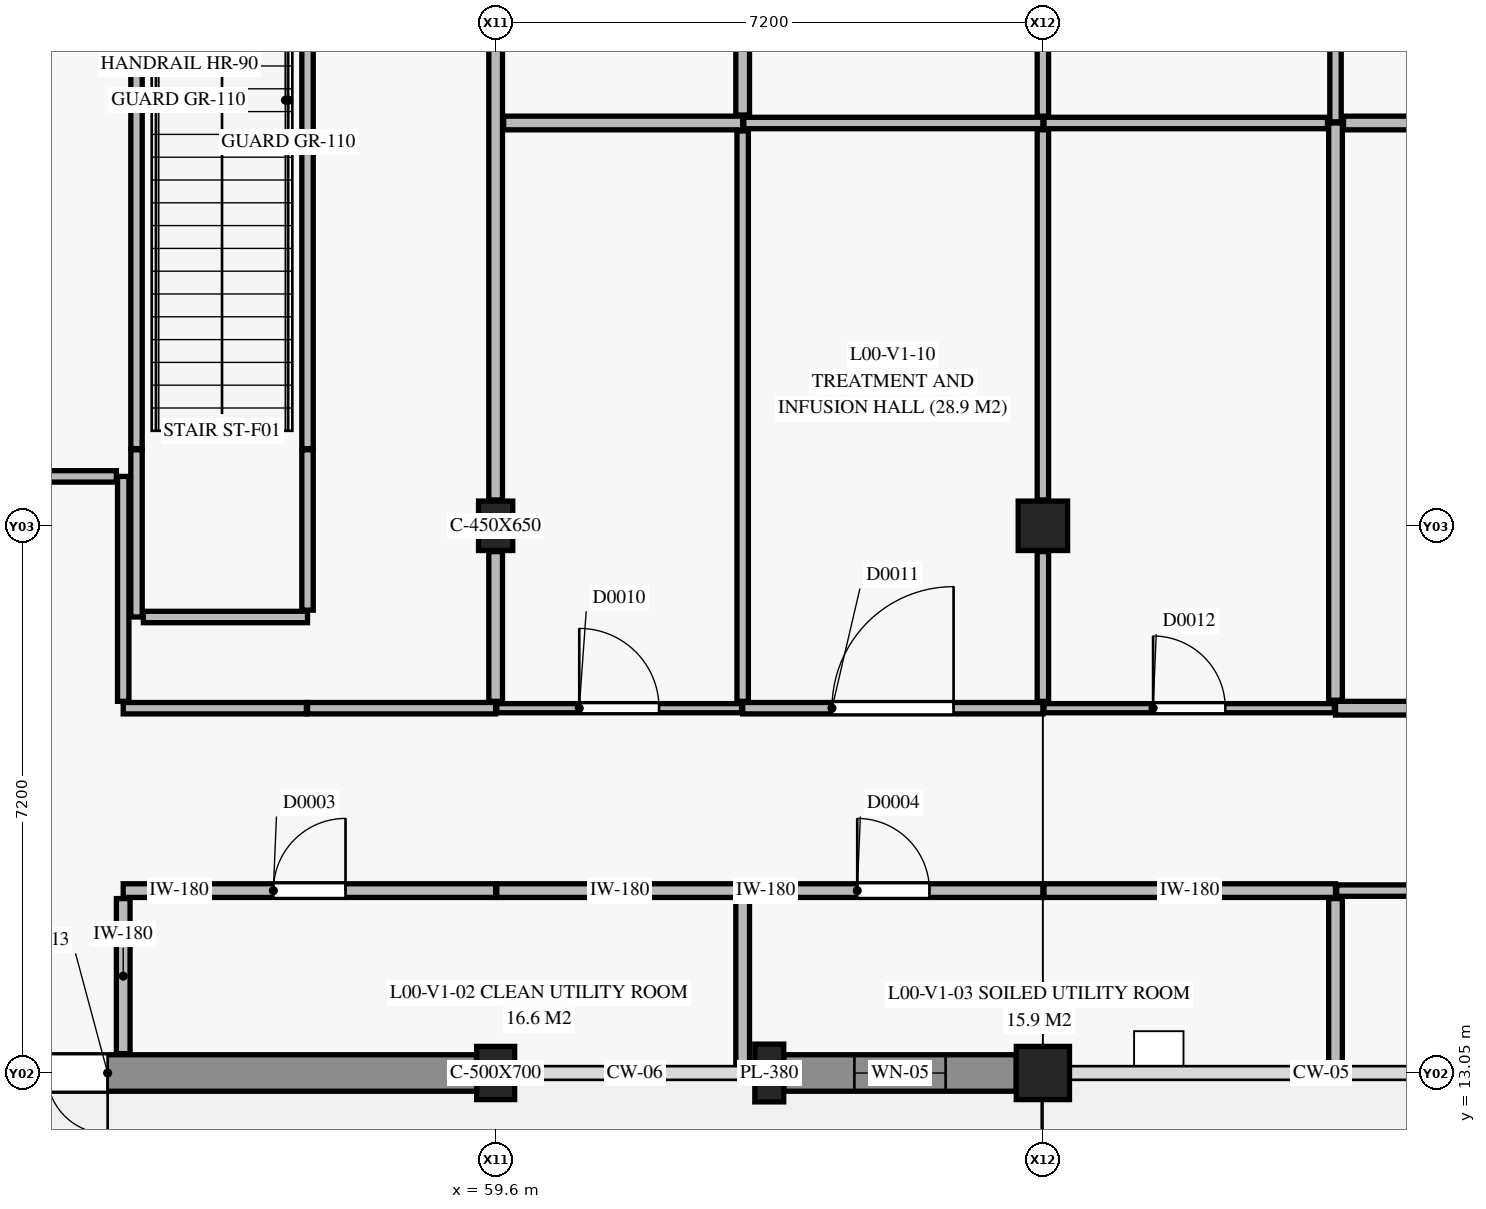
"""IFC4 building model, lengths in metres.
Left out: names, types, materials, properties, quantities, classifications, styles, units other than length and angle.
Written with IfcOpenShell. Run it as: python <this file> out.ifc"""

import sys

from ifc_helpers import new_model, si_unit, direction, frame, frame_2d, origin, origin_2d, place, context, subcontext, project, spatial, rectangle, extrude, element, fill, save


model = new_model("IFC4")
c1 = context("Model", 3, precision=1e-05, world=origin(), true_north=direction((0.0, 1.0)))
c2 = subcontext(c1, "Body", "Model", "MODEL_VIEW")
j1 = project(units=[si_unit("LENGTHUNIT", "METRE"), si_unit("PLANEANGLEUNIT", "RADIAN")], contexts=[c1])
p1 = place(None, origin())
s1 = spatial("IfcSite", under=j1, at=p1, CompositionType="ELEMENT")
p2 = place(p1, origin())
s2 = spatial("IfcBuilding", under=s1, at=p2, CompositionType="ELEMENT")
p3 = place(p2, origin())
s3 = spatial("IfcBuildingStorey", under=s2, at=p3, CompositionType="ELEMENT", Elevation=0.0)
p4 = place(p3, frame((59.6, 13.05, 0.0), z_axis=(0.0, 0.0, 1.0), x_axis=(1.0, 0.0, 0.0)))
e1 = element("IfcColumn", 1, at=p4, inside=s3, PredefinedType="COLUMN", context=c2, shape_type="SweptSolid", body=[
    extrude(rectangle(XDim=0.5, YDim=0.7, at=origin_2d()), origin(), (0.0, 0.0, 1.0), 4.8),
])
p5 = place(p3, frame((59.6, 20.25, 0.0), z_axis=(0.0, 0.0, 1.0), x_axis=(1.0, 0.0, 0.0)))
e2 = element("IfcColumn", 2, at=p5, inside=s3, PredefinedType="COLUMN", context=c2, shape_type="SweptSolid", body=[
    extrude(rectangle(XDim=0.45, YDim=0.65, at=origin_2d()), origin(), (0.0, 0.0, 1.0), 4.8),
])
p6 = place(p3, frame((66.8, 13.05, 0.0), z_axis=(0.0, 0.0, 1.0), x_axis=(1.0, 0.0, 0.0)))
e3 = element("IfcColumn", 3, at=p6, inside=s3, PredefinedType="COLUMN", context=c2, shape_type="SweptSolid", body=[
    extrude(rectangle(XDim=0.7, YDim=0.7, at=origin_2d()), origin(), (0.0, 0.0, 1.0), 4.8),
])
p7 = place(p3, frame((66.8, 20.25, 0.0), z_axis=(0.0, 0.0, 1.0), x_axis=(1.0, 0.0, 0.0)))
e4 = element("IfcColumn", 4, at=p7, inside=s3, PredefinedType="COLUMN", context=c2, shape_type="SweptSolid", body=[
    extrude(rectangle(XDim=0.65, YDim=0.65, at=origin_2d()), origin(), (0.0, 0.0, 1.0), 4.8),
])
p8 = place(p3, frame((63.2, 13.05, 0.0), z_axis=(0.0, 0.0, 1.0), x_axis=(1.0, 0.0, 0.0)))
e5 = element("IfcColumn", 5, at=p8, inside=s3, PredefinedType="PILASTER", context=c2, shape_type="SweptSolid", body=[
    extrude(rectangle(XDim=0.38, YDim=0.76, at=origin_2d()), origin(), (0.0, 0.0, 1.0), 4.8),
])
p9 = place(p3, frame((66.45, 13.05, 0.0), z_axis=(0.0, 0.0, 1.0), x_axis=(-1.0, 0.0, 0.0)))
e6 = element("IfcWall", 6, at=p9, inside=s3, PredefinedType="SOLIDWALL", context=c2, shape_type="SweptSolid", body=[
    extrude(rectangle(XDim=3.06, YDim=0.48, at=frame_2d((1.53, 0.0))), origin(), (0.0, 0.0, 1.0), 3.73),
])
p10 = place(p9, frame((0.93, 0.0, 0.9)))
e7 = element("IfcOpeningElement", 7, at=p10, cuts=e6, PredefinedType="OPENING", context=c2, shape_type="SweptSolid", body=[
    extrude(rectangle(XDim=1.2, YDim=1.8, at=frame_2d((0.6, 0.9))), frame((0.0, 0.25, 0.0), z_axis=(0.0, -1.0, 0.0), x_axis=(1.0, 0.0, 0.0)), (0.0, 0.0, 1.0), 0.5),
])
p11 = place(p3, frame((59.35, 13.05, 0.0), z_axis=(0.0, 0.0, 1.0), x_axis=(-1.0, 0.0, 0.0)))
e8 = element("IfcWall", 8, at=p11, inside=s3, PredefinedType="SOLIDWALL", context=c2, shape_type="SweptSolid", body=[
    extrude(rectangle(XDim=6.95, YDim=0.48, at=frame_2d((3.475, 0.0))), origin(), (0.0, 0.0, 1.0), 3.73),
])
p12 = place(p11, frame((4.855, 0.0, 0.0)))
e9 = element("IfcOpeningElement", 9, at=p12, cuts=e8, PredefinedType="OPENING", context=c2, shape_type="SweptSolid", body=[
    extrude(rectangle(XDim=1.6, YDim=2.3, at=frame_2d((0.8, 1.15))), frame((0.0, 0.25, 0.0), z_axis=(0.0, -1.0, 0.0), x_axis=(1.0, 0.0, 0.0)), (0.0, 0.0, 1.0), 0.5),
])
p13 = place(p3, frame((54.7, 15.45, 0.0), z_axis=(0.0, 0.0, 1.0), x_axis=(1.0, 0.0, 0.0)))
e10 = element("IfcWall", 10, at=p13, inside=s3, PredefinedType="PLUMBINGWALL", context=c2, shape_type="SweptSolid", body=[
    extrude(rectangle(XDim=4.9, YDim=0.18, at=frame_2d((2.45, 0.0))), origin(), (0.0, 0.0, 1.0), 3.955),
])
p14 = place(p13, frame((1.975, 0.0, 0.0)))
e11 = element("IfcOpeningElement", 11, at=p14, cuts=e10, PredefinedType="OPENING", context=c2, shape_type="SweptSolid", body=[
    extrude(rectangle(XDim=0.95, YDim=2.1, at=frame_2d((0.475, 1.05))), frame((0.0, 0.1, 0.0), z_axis=(0.0, -1.0, 0.0), x_axis=(1.0, 0.0, 0.0)), (0.0, 0.0, 1.0), 0.2),
])
p15 = place(p3, frame((59.615, 15.45, 0.0), z_axis=(0.0, 0.0, 1.0), x_axis=(1.0, 0.0, 0.0)))
e12 = element("IfcWall", 12, at=p15, inside=s3, PredefinedType="PLUMBINGWALL", context=c2, shape_type="SweptSolid", body=[
    extrude(rectangle(XDim=3.235, YDim=0.18, at=frame_2d((1.618, 0.0))), origin(), (0.0, 0.0, 1.0), 3.955),
])
p16 = place(p3, frame((54.7, 13.305, 0.0), z_axis=(0.0, 0.0, 1.0), x_axis=(0.0, 1.0, 0.0)))
e13 = element("IfcWall", 13, at=p16, inside=s3, PredefinedType="PLUMBINGWALL", context=c2, shape_type="SweptSolid", body=[
    extrude(rectangle(XDim=2.04, YDim=0.18, at=frame_2d((1.02, 0.0))), origin(), (0.0, 0.0, 1.0), 4.115),
])
p17 = place(p3, frame((62.865, 15.45, 0.0), z_axis=(0.0, 0.0, 1.0), x_axis=(1.0, 0.0, 0.0)))
e14 = element("IfcWall", 14, at=p17, inside=s3, PredefinedType="PLUMBINGWALL", context=c2, shape_type="SweptSolid", body=[
    extrude(rectangle(XDim=3.935, YDim=0.18, at=frame_2d((1.968, 0.0))), origin(), (0.0, 0.0, 1.0), 3.735),
])
p18 = place(p17, frame((1.492, 0.0, 0.0)))
e15 = element("IfcOpeningElement", 15, at=p18, cuts=e14, PredefinedType="OPENING", context=c2, shape_type="SweptSolid", body=[
    extrude(rectangle(XDim=0.95, YDim=2.1, at=frame_2d((0.475, 1.05))), frame((0.0, 0.1, 0.0), z_axis=(0.0, -1.0, 0.0), x_axis=(1.0, 0.0, 0.0)), (0.0, 0.0, 1.0), 0.2),
])
p19 = place(p3, frame((66.815, 15.45, 0.0), z_axis=(0.0, 0.0, 1.0), x_axis=(1.0, 0.0, 0.0)))
e16 = element("IfcWall", 16, at=p19, inside=s3, PredefinedType="PLUMBINGWALL", context=c2, shape_type="SweptSolid", body=[
    extrude(rectangle(XDim=3.835, YDim=0.18, at=frame_2d((1.917, 0.0))), origin(), (0.0, 0.0, 1.0), 3.735),
])
p20 = place(p3, frame((70.65, 17.85, 0.0), z_axis=(0.0, 0.0, 1.0), x_axis=(1.0, 0.0, 0.0)))
e17 = element("IfcWall", 17, at=p20, inside=s3, PredefinedType="PLUMBINGWALL", context=c2, shape_type="SweptSolid", body=[
    extrude(rectangle(XDim=3.35, YDim=0.18, at=frame_2d((1.675, 0.0))), origin(), (0.0, 0.0, 1.0), 3.835),
])
p21 = place(p20, frame((1.2, 0.0, 0.0)))
e18 = element("IfcOpeningElement", 18, at=p21, cuts=e17, PredefinedType="OPENING", context=c2, shape_type="SweptSolid", body=[
    extrude(rectangle(XDim=0.95, YDim=2.1, at=frame_2d((0.475, 1.05))), frame((0.0, 0.1, 0.0), z_axis=(0.0, -1.0, 0.0), x_axis=(1.0, 0.0, 0.0)), (0.0, 0.0, 1.0), 0.2),
])
p22 = place(p3, frame((70.665, 15.45, 0.0), z_axis=(0.0, 0.0, 1.0), x_axis=(1.0, 0.0, 0.0)))
e19 = element("IfcWall", 19, at=p22, inside=s3, PredefinedType="PARTITIONING", context=c2, shape_type="SweptSolid", body=[
    extrude(rectangle(XDim=3.335, YDim=0.15, at=frame_2d((1.667, 0.0))), origin(), (0.0, 0.0, 1.0), 3.835),
])
p23 = place(p3, frame((62.85, 17.85, 0.0), z_axis=(0.0, 0.0, 1.0), x_axis=(1.0, 0.0, 0.0)))
e20 = element("IfcWall", 20, at=p23, inside=s3, PredefinedType="PARTITIONING", context=c2, shape_type="SweptSolid", body=[
    extrude(rectangle(XDim=3.95, YDim=0.15, at=frame_2d((1.975, 0.0))), origin(), (0.0, 0.0, 1.0), 3.735),
])
p24 = place(p23, frame((1.175, 0.0, 0.0)))
e21 = element("IfcOpeningElement", 21, at=p24, cuts=e20, PredefinedType="OPENING", context=c2, shape_type="SweptSolid", body=[
    extrude(rectangle(XDim=1.6, YDim=2.25, at=frame_2d((0.8, 1.125))), frame((0.0, 0.085, 0.0), z_axis=(0.0, -1.0, 0.0), x_axis=(1.0, 0.0, 0.0)), (0.0, 0.0, 1.0), 0.17),
])
p25 = place(p3, frame((54.875, 19.05, 0.0), z_axis=(0.0, 0.0, 1.0), x_axis=(0.0, 1.0, 0.0)))
e22 = element("IfcWall", 22, at=p25, inside=s3, PredefinedType="PARTITIONING", context=c2, shape_type="SweptSolid", body=[
    extrude(rectangle(XDim=2.2, YDim=0.15, at=frame_2d((1.1, 0.0))), origin(), (0.0, 0.0, 1.0), 3.735),
])
p26 = place(p3, frame((57.125, 17.85, 0.0), z_axis=(0.0, 0.0, 1.0), x_axis=(1.0, 0.0, 0.0)))
e23 = element("IfcWall", 23, at=p26, inside=s3, PredefinedType="PARTITIONING", context=c2, shape_type="SweptSolid", body=[
    extrude(rectangle(XDim=2.475, YDim=0.15, at=frame_2d((1.238, 0.0))), origin(), (0.0, 0.0, 1.0), 3.955),
])
p27 = place(p3, frame((54.7, 17.85, 0.0), z_axis=(0.0, 0.0, 1.0), x_axis=(1.0, 0.0, 0.0)))
e24 = element("IfcWall", 24, at=p27, inside=s3, PredefinedType="PARTITIONING", context=c2, shape_type="SweptSolid", body=[
    extrude(rectangle(XDim=2.41, YDim=0.15, at=frame_2d((1.205, 0.0))), origin(), (0.0, 0.0, 1.0), 4.115),
])
p28 = place(p3, frame((54.7, 17.94, 0.0), z_axis=(0.0, 0.0, 1.0), x_axis=(0.0, 1.0, 0.0)))
e25 = element("IfcWall", 25, at=p28, inside=s3, PredefinedType="PARTITIONING", context=c2, shape_type="SweptSolid", body=[
    extrude(rectangle(XDim=2.96, YDim=0.15, at=frame_2d((1.48, 0.0))), origin(), (0.0, 0.0, 1.0), 3.735),
])
p29 = place(p3, frame((52.415, 20.9, 0.0), z_axis=(0.0, 0.0, 1.0), x_axis=(1.0, 0.0, 0.0)))
e26 = element("IfcWall", 26, at=p29, inside=s3, PredefinedType="PARTITIONING", context=c2, shape_type="SweptSolid", body=[
    extrude(rectangle(XDim=2.195, YDim=0.15, at=frame_2d((1.098, 0.0))), origin(), (0.0, 0.0, 1.0), 4.55),
])
p30 = place(p3, frame((59.615, 17.85, 0.0), z_axis=(0.0, 0.0, 1.0), x_axis=(1.0, 0.0, 0.0)))
e27 = element("IfcWall", 27, at=p30, inside=s3, PredefinedType="PARTITIONING", context=c2, shape_type="SweptSolid", body=[
    extrude(rectangle(XDim=3.22, YDim=0.12, at=frame_2d((1.61, 0.0))), origin(), (0.0, 0.0, 1.0), 3.955),
])
p31 = place(p30, frame((1.085, 0.0, 0.0)))
e28 = element("IfcOpeningElement", 28, at=p31, cuts=e27, PredefinedType="OPENING", context=c2, shape_type="SweptSolid", body=[
    extrude(rectangle(XDim=1.05, YDim=2.15, at=frame_2d((0.525, 1.075))), frame((0.0, 0.07, 0.0), z_axis=(0.0, -1.0, 0.0), x_axis=(1.0, 0.0, 0.0)), (0.0, 0.0, 1.0), 0.14),
])
p32 = place(p3, frame((66.815, 17.85, 0.0), z_axis=(0.0, 0.0, 1.0), x_axis=(1.0, 0.0, 0.0)))
e29 = element("IfcWall", 29, at=p32, inside=s3, PredefinedType="PARTITIONING", context=c2, shape_type="SweptSolid", body=[
    extrude(rectangle(XDim=3.82, YDim=0.12, at=frame_2d((1.91, 0.0))), origin(), (0.0, 0.0, 1.0), 3.735),
])
p33 = place(p32, frame((1.435, 0.0, 0.0)))
e30 = element("IfcOpeningElement", 30, at=p33, cuts=e29, PredefinedType="OPENING", context=c2, shape_type="SweptSolid", body=[
    extrude(rectangle(XDim=0.95, YDim=2.1, at=frame_2d((0.475, 1.05))), frame((0.0, 0.07, 0.0), z_axis=(0.0, -1.0, 0.0), x_axis=(1.0, 0.0, 0.0)), (0.0, 0.0, 1.0), 0.14),
])
for number, where, z_axis, x_axis in (
    (31, (62.85, 13.155, 0.0), (0.0, 0.0, 1.0), (0.0, 1.0, 0.0)),
    (32, (70.65, 13.155, 0.0), (0.0, 0.0, 1.0), (0.0, 1.0, 0.0)),
):
    element("IfcWall", number, at=place(p3, frame(where, z_axis=z_axis, x_axis=x_axis)), inside=s3, PredefinedType="PLUMBINGWALL", context=c2, shape_type="SweptSolid", body=[
        extrude(rectangle(XDim=2.19, YDim=0.18, at=frame_2d((1.095, 0.0))), origin(), (0.0, 0.0, 1.0), 4.55),
    ])
p34 = place(p3, frame((59.6, 17.94, 0.0), z_axis=(0.0, 0.0, 1.0), x_axis=(0.0, 1.0, 0.0)))
e33 = element("IfcWall", 33, at=p34, inside=s3, PredefinedType="PLUMBINGWALL", context=c2, shape_type="SweptSolid", body=[
    extrude(rectangle(XDim=1.97, YDim=0.18, at=frame_2d((0.985, 0.0))), origin(), (0.0, 0.0, 1.0), 3.955),
])
p35 = place(p3, frame((59.6, 20.59, 0.0), z_axis=(0.0, 0.0, 1.0), x_axis=(0.0, 1.0, 0.0)))
e34 = element("IfcWall", 34, at=p35, inside=s3, PredefinedType="PLUMBINGWALL", context=c2, shape_type="SweptSolid", body=[
    extrude(rectangle(XDim=6.545, YDim=0.18, at=frame_2d((3.272, 0.0))), origin(), (0.0, 0.0, 1.0), 3.985),
])
p36 = place(p3, frame((59.705, 25.55, 0.0), z_axis=(0.0, 0.0, 1.0), x_axis=(1.0, 0.0, 0.0)))
e35 = element("IfcWall", 35, at=p36, inside=s3, PredefinedType="PLUMBINGWALL", context=c2, shape_type="SweptSolid", body=[
    extrude(rectangle(XDim=3.145, YDim=0.18, at=frame_2d((1.573, 0.0))), origin(), (0.0, 0.0, 1.0), 4.55),
])
p37 = place(p3, frame((70.65, 17.955, 0.0), z_axis=(0.0, 0.0, 1.0), x_axis=(0.0, 1.0, 0.0)))
e36 = element("IfcWall", 36, at=p37, inside=s3, PredefinedType="PLUMBINGWALL", context=c2, shape_type="SweptSolid", body=[
    extrude(rectangle(XDim=7.595, YDim=0.18, at=frame_2d((3.797, 0.0))), origin(), (0.0, 0.0, 1.0), 3.955),
])
p38 = place(p3, frame((70.755, 25.55, 0.0), z_axis=(0.0, 0.0, 1.0), x_axis=(1.0, 0.0, 0.0)))
e37 = element("IfcWall", 37, at=p38, inside=s3, PredefinedType="PLUMBINGWALL", context=c2, shape_type="SweptSolid", body=[
    extrude(rectangle(XDim=3.245, YDim=0.18, at=frame_2d((1.623, 0.0))), origin(), (0.0, 0.0, 1.0), 4.55),
])
p39 = place(p3, frame((62.85, 25.655, 0.0), z_axis=(0.0, 0.0, 1.0), x_axis=(0.0, 1.0, 0.0)))
e38 = element("IfcWall", 38, at=p39, inside=s3, PredefinedType="PLUMBINGWALL", context=c2, shape_type="SweptSolid", body=[
    extrude(rectangle(XDim=6.79, YDim=0.18, at=frame_2d((3.395, 0.0))), origin(), (0.0, 0.0, 1.0), 4.55),
])
p40 = place(p3, frame((62.85, 17.94, 0.0), z_axis=(0.0, 0.0, 1.0), x_axis=(0.0, 1.0, 0.0)))
e39 = element("IfcWall", 39, at=p40, inside=s3, PredefinedType="PARTITIONING", context=c2, shape_type="SweptSolid", body=[
    extrude(rectangle(XDim=7.505, YDim=0.15, at=frame_2d((3.752, 0.0))), origin(), (0.0, 0.0, 1.0), 3.835),
])
p41 = place(p3, frame((62.865, 25.55, 0.0), z_axis=(0.0, 0.0, 1.0), x_axis=(1.0, 0.0, 0.0)))
e40 = element("IfcWall", 40, at=p41, inside=s3, PredefinedType="PARTITIONING", context=c2, shape_type="SweptSolid", body=[
    extrude(rectangle(XDim=3.935, YDim=0.15, at=frame_2d((1.968, 0.0))), origin(), (0.0, 0.0, 1.0), 4.55),
])
p42 = place(p3, frame((66.8, 17.94, 0.0), z_axis=(0.0, 0.0, 1.0), x_axis=(0.0, 1.0, 0.0)))
e41 = element("IfcWall", 41, at=p42, inside=s3, PredefinedType="PARTITIONING", context=c2, shape_type="SweptSolid", body=[
    extrude(rectangle(XDim=1.97, YDim=0.15, at=frame_2d((0.985, 0.0))), origin(), (0.0, 0.0, 1.0), 3.735),
])
p43 = place(p3, frame((66.8, 20.59, 0.0), z_axis=(0.0, 0.0, 1.0), x_axis=(0.0, 1.0, 0.0)))
e42 = element("IfcWall", 42, at=p43, inside=s3, PredefinedType="PARTITIONING", context=c2, shape_type="SweptSolid", body=[
    extrude(rectangle(XDim=4.87, YDim=0.15, at=frame_2d((2.435, 0.0))), origin(), (0.0, 0.0, 1.0), 4.55),
])
p44 = place(p3, frame((66.815, 25.55, 0.0), z_axis=(0.0, 0.0, 1.0), x_axis=(1.0, 0.0, 0.0)))
e43 = element("IfcWall", 43, at=p44, inside=s3, PredefinedType="PARTITIONING", context=c2, shape_type="SweptSolid", body=[
    extrude(rectangle(XDim=3.73, YDim=0.15, at=frame_2d((1.865, 0.0))), origin(), (0.0, 0.0, 1.0), 4.55),
])
p45 = place(p3, frame((66.8, 25.64, 0.0), z_axis=(0.0, 0.0, 1.0), x_axis=(0.0, 1.0, 0.0)))
e44 = element("IfcWall", 44, at=p45, inside=s3, PredefinedType="PARTITIONING", context=c2, shape_type="SweptSolid", body=[
    extrude(rectangle(XDim=1.495, YDim=0.15, at=frame_2d((0.748, 0.0))), origin(), (0.0, 0.0, 1.0), 4.55),
])
p46 = place(p3, frame((70.65, 25.565, 0.0), z_axis=(0.0, 0.0, 1.0), x_axis=(0.0, 1.0, 0.0)))
e45 = element("IfcWall", 45, at=p46, inside=s3, PredefinedType="PARTITIONING", context=c2, shape_type="SweptSolid", body=[
    extrude(rectangle(XDim=6.895, YDim=0.15, at=frame_2d((3.448, 0.0))), origin(), (0.0, 0.0, 1.0), 4.55),
])
p47 = place(p3, frame((54.875, 21.265, 0.0), z_axis=(0.0, 0.0, 1.0), x_axis=(0.0, 1.0, 0.0)))
e46 = element("IfcWall", 46, at=p47, inside=s3, PredefinedType="PARTITIONING", context=c2, shape_type="SweptSolid", body=[
    extrude(rectangle(XDim=8.968, YDim=0.15, at=frame_2d((4.484, 0.0))), origin(), (0.0, 0.0, 1.0), 4.55),
])
p48 = place(p3, frame((54.965, 19.05, 0.0), z_axis=(0.0, 0.0, 1.0), x_axis=(1.0, 0.0, 0.0)))
e47 = element("IfcWall", 47, at=p48, inside=s3, PredefinedType="PARTITIONING", context=c2, shape_type="SweptSolid", body=[
    extrude(rectangle(XDim=2.16, YDim=0.15, at=frame_2d((1.08, 0.0))), origin(), (0.0, 0.0, 1.0), 4.55),
])
p49 = place(p3, frame((57.125, 19.14, 0.0), z_axis=(0.0, 0.0, 1.0), x_axis=(0.0, 1.0, 0.0)))
e48 = element("IfcWall", 48, at=p49, inside=s3, PredefinedType="PARTITIONING", context=c2, shape_type="SweptSolid", body=[
    extrude(rectangle(XDim=2.11, YDim=0.15, at=frame_2d((1.055, 0.0))), origin(), (0.0, 0.0, 1.0), 3.735),
])
p50 = place(p3, frame((57.125, 21.265, 0.0), z_axis=(0.0, 0.0, 1.0), x_axis=(0.0, 1.0, 0.0)))
e49 = element("IfcWall", 49, at=p50, inside=s3, PredefinedType="PARTITIONING", context=c2, shape_type="SweptSolid", body=[
    extrude(rectangle(XDim=8.968, YDim=0.15, at=frame_2d((4.484, 0.0))), origin(), (0.0, 0.0, 1.0), 4.55),
])
p51 = place(p10, origin())
e50 = element("IfcWindow", 50, at=p51, inside=s3, PartitioningType="SINGLE_PANEL", PredefinedType="WINDOW", context=c2, shape_type="SweptSolid", body=[
    extrude(rectangle(XDim=1.2, YDim=1.8, at=frame_2d((0.6, 0.9))), frame((0.0, 0.03, 0.0), z_axis=(0.0, -1.0, 0.0), x_axis=(1.0, 0.0, 0.0)), (0.0, 0.0, 1.0), 0.06),
])
fill(e7, e50)
p52 = place(p12, origin())
e51 = element("IfcDoor", 51, at=p52, inside=s3, OperationType="DOUBLE_DOOR_SINGLE_SWING", PredefinedType="DOOR", context=c2, shape_type="SweptSolid", body=[
    extrude(rectangle(XDim=1.6, YDim=2.3, at=frame_2d((0.8, 1.15))), frame((0.0, 0.025, 0.0), z_axis=(0.0, -1.0, 0.0), x_axis=(1.0, 0.0, 0.0)), (0.0, 0.0, 1.0), 0.05),
])
fill(e9, e51)
p53 = place(p14, origin())
e52 = element("IfcDoor", 52, at=p53, inside=s3, OperationType="SINGLE_SWING_RIGHT", PredefinedType="DOOR", context=c2, shape_type="SweptSolid", body=[
    extrude(rectangle(XDim=0.95, YDim=2.1, at=frame_2d((0.475, 1.05))), frame((0.0, 0.025, 0.0), z_axis=(0.0, -1.0, 0.0), x_axis=(1.0, 0.0, 0.0)), (0.0, 0.0, 1.0), 0.05),
])
fill(e11, e52)
p54 = place(p18, origin())
e53 = element("IfcDoor", 53, at=p54, inside=s3, OperationType="SINGLE_SWING_LEFT", PredefinedType="DOOR", context=c2, shape_type="SweptSolid", body=[
    extrude(rectangle(XDim=0.95, YDim=2.1, at=frame_2d((0.475, 1.05))), frame((0.0, 0.025, 0.0), z_axis=(0.0, -1.0, 0.0), x_axis=(1.0, 0.0, 0.0)), (0.0, 0.0, 1.0), 0.05),
])
fill(e15, e53)
p55 = place(p31, origin())
e54 = element("IfcDoor", 54, at=p55, inside=s3, OperationType="SINGLE_SWING_LEFT", PredefinedType="DOOR", context=c2, shape_type="SweptSolid", body=[
    extrude(rectangle(XDim=1.05, YDim=2.15, at=frame_2d((0.525, 1.075))), frame((0.0, 0.025, 0.0), z_axis=(0.0, -1.0, 0.0), x_axis=(1.0, 0.0, 0.0)), (0.0, 0.0, 1.0), 0.05),
])
fill(e28, e54)
p56 = place(p24, origin())
e55 = element("IfcDoor", 55, at=p56, inside=s3, OperationType="SINGLE_SWING_RIGHT", PredefinedType="DOOR", context=c2, shape_type="SweptSolid", body=[
    extrude(rectangle(XDim=1.6, YDim=2.25, at=frame_2d((0.8, 1.125))), frame((0.0, 0.025, 0.0), z_axis=(0.0, -1.0, 0.0), x_axis=(1.0, 0.0, 0.0)), (0.0, 0.0, 1.0), 0.05),
])
fill(e21, e55)
p57 = place(p33, origin())
e56 = element("IfcDoor", 56, at=p57, inside=s3, OperationType="SINGLE_SWING_LEFT", PredefinedType="DOOR", context=c2, shape_type="SweptSolid", body=[
    extrude(rectangle(XDim=0.95, YDim=2.1, at=frame_2d((0.475, 1.05))), frame((0.0, 0.025, 0.0), z_axis=(0.0, -1.0, 0.0), x_axis=(1.0, 0.0, 0.0)), (0.0, 0.0, 1.0), 0.05),
])
fill(e30, e56)
save(model, sys.argv[1])
